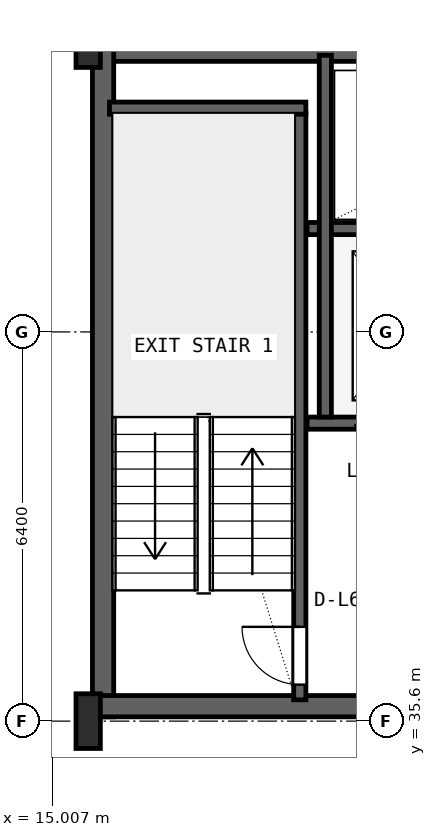
"""IFC4 building model, lengths in metres.
Left out: names, types, materials, properties, quantities, classifications, styles, units other than length and angle.
Written with IfcOpenShell. Run it as: python <this file> out.ifc"""

import sys

from ifc_helpers import new_model, si_unit, direction, frame, frame_2d, origin, origin_2d, place, context, subcontext, project, spatial, rectangle, i_section, extrude, source, transform, mapped, element, fill, save


model = new_model("IFC4")
c1 = context("Model", 3, precision=1e-05, world=origin(), true_north=direction((0.0, 1.0)))
c2 = subcontext(c1, "Body", "Model", "MODEL_VIEW")
j1 = project(units=[si_unit("LENGTHUNIT", "METRE"), si_unit("PLANEANGLEUNIT", "RADIAN")], contexts=[c1])
p1 = place(None, origin())
s1 = spatial("IfcSite", under=j1, at=p1, CompositionType="ELEMENT")
p2 = place(p1, origin())
s2 = spatial("IfcBuilding", under=s1, at=p2, CompositionType="ELEMENT")
p3 = place(p2, frame((0.0, 0.0, 250.8)))
s3 = spatial("IfcBuildingStorey", under=s2, at=p3, CompositionType="ELEMENT", Elevation=250.8)
p4 = place(p3, frame((15.6, 46.625, 0.0), z_axis=(0.0, 0.0, 1.0), x_axis=(1.0, 0.0, 0.0)))
e1 = element("IfcWall", 1, at=p4, inside=s3, PredefinedType="SHEAR", context=c2, shape_type="SweptSolid", body=[
    extrude(rectangle(XDim=36.8, YDim=0.35, at=frame_2d((18.4, 0.0))), origin(), (0.0, 0.0, 1.0), 3.55),
])
p5 = place(p3, frame((15.845, 35.67, 0.0), z_axis=(0.0, 0.0, 1.0), x_axis=(0.0, 1.0, 0.0)))
e2 = element("IfcWall", 2, at=p5, inside=s3, PredefinedType="SHEAR", context=c2, shape_type="SweptSolid", body=[
    extrude(rectangle(XDim=11.13, YDim=0.35, at=frame_2d((5.565, 0.0))), origin(), (0.0, 0.0, 1.0), 3.55),
])
p6 = place(p3, frame((15.67, 35.845, 0.0), z_axis=(0.0, 0.0, 1.0), x_axis=(1.0, 0.0, 0.0)))
e3 = element("IfcWall", 3, at=p6, inside=s3, PredefinedType="SHEAR", context=c2, shape_type="SweptSolid", body=[
    extrude(rectangle(XDim=9.13, YDim=0.35, at=frame_2d((4.565, 0.0))), origin(), (0.0, 0.0, 1.0), 3.55),
])
p7 = place(p6, frame((5.4, 0.0, 0.0)))
e4 = element("IfcOpeningElement", 4, at=p7, cuts=e3, PredefinedType="OPENING", context=c2, shape_type="SweptSolid", body=[
    extrude(rectangle(XDim=1.0, YDim=2.1, at=frame_2d((0.5, 1.05))), frame((0.0, 0.185, 0.0), z_axis=(0.0, -1.0, 0.0), x_axis=(1.0, 0.0, 0.0)), (0.0, 0.0, 1.0), 0.37),
])
m1 = source(origin(), c2, "Body", "SweptSolid", [
    extrude(i_section(OverallWidth=0.4, OverallDepth=0.9, WebThickness=0.016, FlangeThickness=0.028, FilletRadius=0.016, at=origin_2d()), origin(), (0.0, 0.0, 1.0), 3.8),
])
for number, where, z_axis, x_axis in (
    (5, (15.6, 35.6, 0.0), (0.0, 0.0, 1.0), (1.0, 0.0, 0.0)),
    (6, (15.6, 46.8, 0.0), (0.0, 0.0, 1.0), (1.0, 0.0, 0.0)),
):
    element("IfcColumn", number, at=place(p3, frame(where, z_axis=z_axis, x_axis=x_axis)), inside=s3, PredefinedType="COLUMN", context=c2, shape_type="MappedRepresentation", body=[
        mapped(m1, transform((0.0, 0.0, 0.0), x_axis=(1.0, 0.0, 0.0), y_axis=(0.0, 1.0, 0.0), z_axis=(0.0, 0.0, 1.0), scale=1.0)),
    ])
p8 = place(p3, frame((19.08, 35.95, 0.0), z_axis=(0.0, 0.0, 1.0), x_axis=(0.0, 1.0, 0.0)))
e7 = element("IfcWall", 7, at=p8, inside=s3, PredefinedType="SHEAR", context=c2, shape_type="SweptSolid", body=[
    extrude(rectangle(XDim=9.65, YDim=0.2, at=frame_2d((4.825, 0.0))), origin(), (0.0, 0.0, 1.0), 3.55),
])
p9 = place(p8, frame((0.25, 0.0, 0.0)))
e8 = element("IfcOpeningElement", 8, at=p9, cuts=e7, PredefinedType="OPENING", context=c2, shape_type="SweptSolid", body=[
    extrude(rectangle(XDim=0.95, YDim=2.1, at=frame_2d((0.475, 1.05))), frame((0.0, 0.11, 0.0), z_axis=(0.0, -1.0, 0.0), x_axis=(1.0, 0.0, 0.0)), (0.0, 0.0, 1.0), 0.22),
])
p10 = place(p3, frame((15.95, 45.68, 0.0), z_axis=(0.0, 0.0, 1.0), x_axis=(1.0, 0.0, 0.0)))
e9 = element("IfcWall", 9, at=p10, inside=s3, PredefinedType="SHEAR", context=c2, shape_type="SweptSolid", body=[
    extrude(rectangle(XDim=3.23, YDim=0.2, at=frame_2d((1.615, 0.0))), origin(), (0.0, 0.0, 1.0), 3.55),
])
p11 = place(p3, frame((19.2, 40.5, 0.0), z_axis=(0.0, 0.0, 1.0), x_axis=(1.0, 0.0, 0.0)))
e10 = element("IfcWall", 10, at=p11, inside=s3, PredefinedType="SHEAR", context=c2, shape_type="SweptSolid", body=[
    extrude(rectangle(XDim=5.52, YDim=0.2, at=frame_2d((2.76, 0.0))), origin(), (0.0, 0.0, 1.0), 3.55),
])
p12 = place(p11, frame((1.05, 0.0, 0.0)))
e11 = element("IfcOpeningElement", 11, at=p12, cuts=e10, PredefinedType="OPENING", context=c2, shape_type="SweptSolid", body=[
    extrude(rectangle(XDim=1.1, YDim=2.18, at=frame_2d((0.55, 1.09))), frame((0.0, 0.11, 0.0), z_axis=(0.0, -1.0, 0.0), x_axis=(1.0, 0.0, 0.0)), (0.0, 0.0, 1.0), 0.22),
])
p13 = place(p11, frame((3.65, 0.0, 0.0)))
e12 = element("IfcOpeningElement", 12, at=p13, cuts=e10, PredefinedType="OPENING", context=c2, shape_type="SweptSolid", body=[
    extrude(rectangle(XDim=1.1, YDim=2.18, at=frame_2d((0.55, 1.09))), frame((0.0, 0.11, 0.0), z_axis=(0.0, -1.0, 0.0), x_axis=(1.0, 0.0, 0.0)), (0.0, 0.0, 1.0), 0.22),
])
p14 = place(p3, frame((19.2, 43.7, 0.0), z_axis=(0.0, 0.0, 1.0), x_axis=(1.0, 0.0, 0.0)))
e13 = element("IfcWall", 13, at=p14, inside=s3, PredefinedType="SHEAR", context=c2, shape_type="SweptSolid", body=[
    extrude(rectangle(XDim=5.52, YDim=0.2, at=frame_2d((2.76, 0.0))), origin(), (0.0, 0.0, 1.0), 3.55),
])
p15 = place(p3, frame((19.5, 40.6, 0.0), z_axis=(0.0, 0.0, 1.0), x_axis=(0.0, 1.0, 0.0)))
e14 = element("IfcWall", 14, at=p15, inside=s3, PredefinedType="SHEAR", context=c2, shape_type="SweptSolid", body=[
    extrude(rectangle(XDim=5.95, YDim=0.2, at=frame_2d((2.975, 0.0))), origin(), (0.0, 0.0, 1.0), 3.55),
])
m2 = source(origin(), c2, "Body", "SweptSolid", [
    extrude(rectangle(XDim=0.95, YDim=2.1, at=frame_2d((0.475, 1.05))), frame((0.0, 0.025, 0.0), z_axis=(0.0, -1.0, 0.0), x_axis=(1.0, 0.0, 0.0)), (0.0, 0.0, 1.0), 0.05),
])
p16 = place(p9, origin())
e15 = element("IfcDoor", 15, at=p16, inside=s3, OperationType="SINGLE_SWING_RIGHT", PredefinedType="DOOR", context=c2, shape_type="MappedRepresentation", body=[
    mapped(m2, transform((0.0, 0.0, 0.0), x_axis=(1.0, 0.0, 0.0), y_axis=(0.0, 1.0, 0.0), z_axis=(0.0, 0.0, 1.0), scale=1.0)),
])
fill(e8, e15)
save(model, sys.argv[1])
